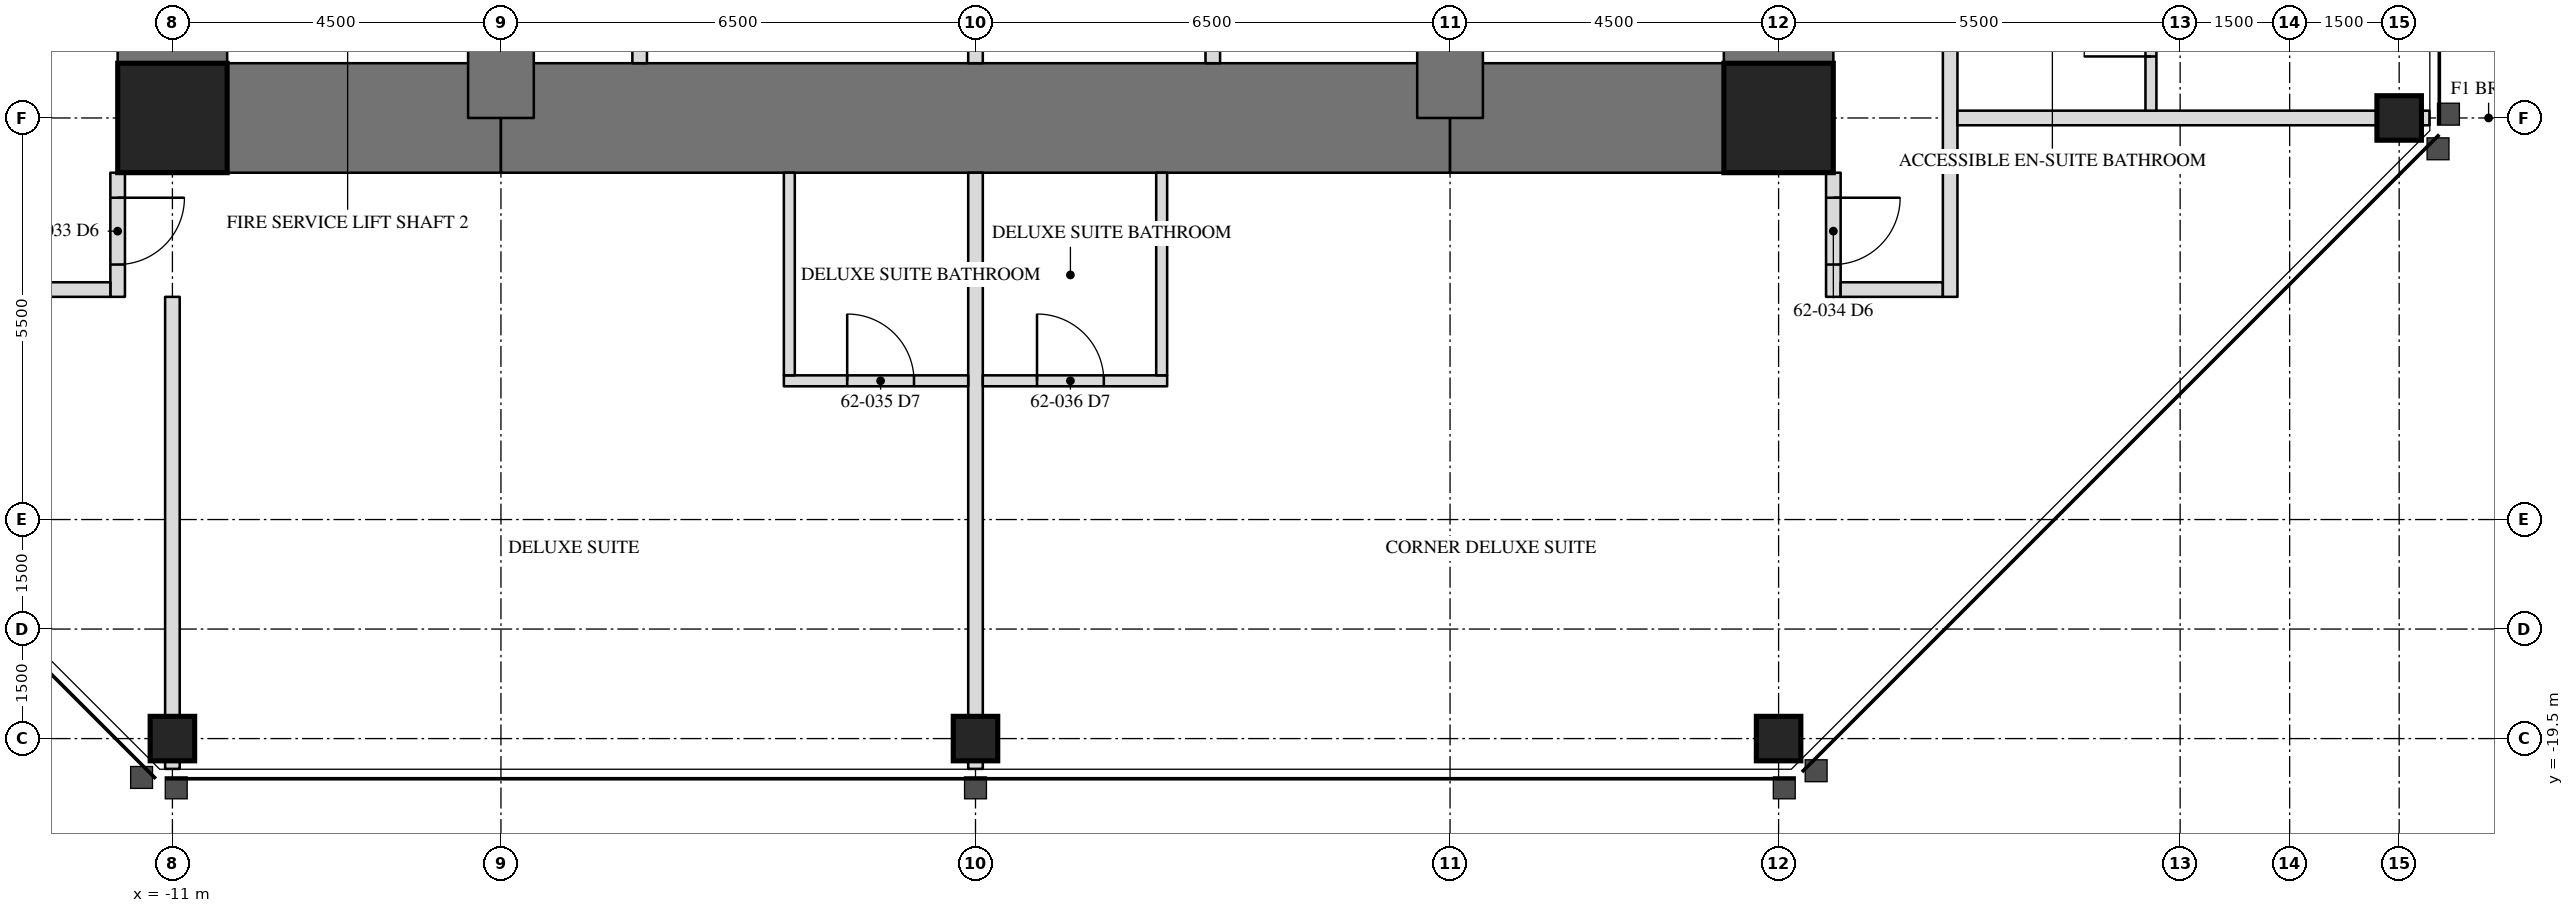
"""IFC4 building model, lengths in metres.
Left out: names, types, materials, properties, quantities, classifications, styles, units other than length and angle.
Written with IfcOpenShell. Run it as: python <this file> out.ifc"""

import sys

from ifc_helpers import new_model, si_unit, direction, frame, frame_2d, origin, origin_2d, place, context, subcontext, project, spatial, rectangle, hollow_rectangle, extrude, element, fill, save


model = new_model("IFC4")
c1 = context("Model", 3, precision=1e-05, world=origin(), true_north=direction((0.0, 1.0)))
c2 = subcontext(c1, "Body", "Model", "MODEL_VIEW")
j1 = project(units=[si_unit("LENGTHUNIT", "METRE"), si_unit("PLANEANGLEUNIT", "RADIAN")], contexts=[c1])
p1 = place(None, origin())
s1 = spatial("IfcSite", under=j1, at=p1, CompositionType="ELEMENT")
p2 = place(p1, origin())
s2 = spatial("IfcBuilding", under=s1, at=p2, CompositionType="ELEMENT")
p3 = place(p2, frame((0.0, 0.0, 253.7)))
s3 = spatial("IfcBuildingStorey", under=s2, at=p3, CompositionType="ELEMENT", Elevation=253.7)
for number, where, z_axis, x_axis in (
    (1, (-11.0, -19.5, 0.0), (0.0, 0.0, 1.0), (1.0, 0.0, 0.0)),
    (2, (0.0, -19.5, 0.0), (0.0, 0.0, 1.0), (1.0, 0.0, 0.0)),
    (3, (11.0, -19.5, 0.0), (0.0, 0.0, 1.0), (1.0, 0.0, 0.0)),
    (4, (19.5, -11.0, 0.0), (0.0, 0.0, 1.0), (0.0, 1.0, 0.0)),
):
    element("IfcColumn", number, at=place(p3, frame(where, z_axis=z_axis, x_axis=x_axis)), inside=s3, PredefinedType="COLUMN", context=c2, shape_type="SweptSolid", body=[
        extrude(hollow_rectangle(XDim=0.61, YDim=0.61, WallThickness=0.051, at=origin_2d()), origin(), (0.0, 0.0, 1.0), 3.5),
    ])
p4 = place(p3, frame((11.0, -11.0, 0.0), z_axis=(0.0, 0.0, 1.0), x_axis=(0.0, 1.0, 0.0)))
e5 = element("IfcWall", 5, at=p4, inside=s3, PredefinedType="SHEAR", context=c2, shape_type="SweptSolid", body=[
    extrude(rectangle(XDim=22.0, YDim=1.5, at=frame_2d((11.0, 0.0))), origin(), (0.0, 0.0, 1.0), 3.5),
])
p5 = place(p4, frame((15.393, 0.0, 0.0)))
e6 = element("IfcOpeningElement", 6, at=p5, cuts=e5, PredefinedType="OPENING", context=c2, shape_type="SweptSolid", body=[
    extrude(rectangle(XDim=0.915, YDim=2.134, at=frame_2d((0.458, 1.067))), frame((0.0, 0.76, 0.0), z_axis=(0.0, -1.0, 0.0), x_axis=(1.0, 0.0, 0.0)), (0.0, 0.0, 1.0), 1.52),
])
p6 = place(p3, frame((-11.0, 11.0, 0.0), z_axis=(0.0, 0.0, 1.0), x_axis=(0.0, -1.0, 0.0)))
e7 = element("IfcWall", 7, at=p6, inside=s3, PredefinedType="SHEAR", context=c2, shape_type="SweptSolid", body=[
    extrude(rectangle(XDim=22.0, YDim=1.5, at=frame_2d((11.0, 0.0))), origin(), (0.0, 0.0, 1.0), 3.5),
])
p7 = place(p6, frame((15.393, 0.0, 0.0)))
e8 = element("IfcOpeningElement", 8, at=p7, cuts=e7, PredefinedType="OPENING", context=c2, shape_type="SweptSolid", body=[
    extrude(rectangle(XDim=0.915, YDim=2.134, at=frame_2d((0.458, 1.067))), frame((0.0, 0.76, 0.0), z_axis=(0.0, -1.0, 0.0), x_axis=(1.0, 0.0, 0.0)), (0.0, 0.0, 1.0), 1.52),
])
p8 = place(p3, frame((-11.0, -11.0, 0.0), z_axis=(0.0, 0.0, 1.0), x_axis=(1.0, 0.0, 0.0)))
e9 = element("IfcWall", 9, at=p8, inside=s3, PredefinedType="SHEAR", context=c2, shape_type="SweptSolid", body=[
    extrude(rectangle(XDim=4.5, YDim=1.5, at=frame_2d((2.25, 0.0))), origin(), (0.0, 0.0, 1.0), 3.5),
])
p9 = place(p3, frame((-6.5, -11.0, 0.0), z_axis=(0.0, 0.0, 1.0), x_axis=(1.0, 0.0, 0.0)))
e10 = element("IfcWall", 10, at=p9, inside=s3, PredefinedType="SHEAR", context=c2, shape_type="SweptSolid", body=[
    extrude(rectangle(XDim=13.0, YDim=1.5, at=frame_2d((6.5, 0.0))), origin(), (0.0, 0.0, 1.0), 3.5),
])
p10 = place(p3, frame((6.5, -11.0, 0.0), z_axis=(0.0, 0.0, 1.0), x_axis=(1.0, 0.0, 0.0)))
e11 = element("IfcWall", 11, at=p10, inside=s3, PredefinedType="SHEAR", context=c2, shape_type="SweptSolid", body=[
    extrude(rectangle(XDim=4.5, YDim=1.5, at=frame_2d((2.25, 0.0))), origin(), (0.0, 0.0, 1.0), 3.5),
])
for number, where, z_axis, x_axis in (
    (12, (6.5, -11.0, 0.0), (0.0, 0.0, 1.0), (0.0, 1.0, 0.0)),
    (13, (-6.5, -6.5, 0.0), (0.0, 0.0, 1.0), (0.0, -1.0, 0.0)),
):
    element("IfcWall", number, at=place(p3, frame(where, z_axis=z_axis, x_axis=x_axis)), inside=s3, PredefinedType="SHEAR", context=c2, shape_type="SweptSolid", body=[
        extrude(rectangle(XDim=4.5, YDim=0.9, at=frame_2d((2.25, 0.0))), origin(), (0.0, 0.0, 1.0), 3.5),
    ])
for number, where, z_axis, x_axis in (
    (14, (-11.0, -11.0, 0.0), (0.0, 0.0, 1.0), (1.0, 0.0, 0.0)),
    (15, (11.0, -11.0, 0.0), (0.0, 0.0, 1.0), (1.0, 0.0, 0.0)),
):
    element("IfcColumn", number, at=place(p3, frame(where, z_axis=z_axis, x_axis=x_axis)), inside=s3, PredefinedType="COLUMN", context=c2, shape_type="SweptSolid", body=[
        extrude(hollow_rectangle(XDim=1.499, YDim=1.499, WallThickness=0.102, at=origin_2d()), origin(), (0.0, 0.0, 1.0), 3.5),
    ])
for number, where, z_axis, x_axis in (
    (16, (0.0, -10.25, 0.0), (0.0, 0.0, 1.0), (0.0, 1.0, 0.0)),
    (17, (3.25, -10.25, 0.0), (0.0, 0.0, 1.0), (0.0, 1.0, 0.0)),
    (18, (-4.6, -10.25, 0.0), (0.0, 0.0, 1.0), (0.0, 1.0, 0.0)),
):
    element("IfcWall", number, at=place(p3, frame(where, z_axis=z_axis, x_axis=x_axis)), inside=s3, PredefinedType="PARTITIONING", context=c2, shape_type="SweptSolid", body=[
        extrude(rectangle(XDim=3.3, YDim=0.2, at=frame_2d((1.65, 0.0))), origin(), (0.0, 0.0, 1.0), 3.31),
    ])
p11 = place(p3, frame((-11.75, -11.75, 0.0), z_axis=(0.0, 0.0, 1.0), x_axis=(0.0, -1.0, 0.0)))
e19 = element("IfcWall", 19, at=p11, inside=s3, PredefinedType="PARTITIONING", context=c2, shape_type="SweptSolid", body=[
    extrude(rectangle(XDim=1.7, YDim=0.2, at=frame_2d((0.85, 0.0))), origin(), (0.0, 0.0, 1.0), 3.31),
])
p12 = place(p11, frame((0.343, 0.0, 0.0)))
e20 = element("IfcOpeningElement", 20, at=p12, cuts=e19, PredefinedType="OPENING", context=c2, shape_type="SweptSolid", body=[
    extrude(rectangle(XDim=0.915, YDim=2.134, at=frame_2d((0.458, 1.067))), frame((0.0, 0.11, 0.0), z_axis=(0.0, -1.0, 0.0), x_axis=(1.0, 0.0, 0.0)), (0.0, 0.0, 1.0), 0.22),
])
p13 = place(p3, frame((11.75, -11.75, 0.0), z_axis=(0.0, 0.0, 1.0), x_axis=(0.0, -1.0, 0.0)))
e21 = element("IfcWall", 21, at=p13, inside=s3, PredefinedType="PARTITIONING", context=c2, shape_type="SweptSolid", body=[
    extrude(rectangle(XDim=1.7, YDim=0.2, at=frame_2d((0.85, 0.0))), origin(), (0.0, 0.0, 1.0), 3.31),
])
p14 = place(p13, frame((0.343, 0.0, 0.0)))
e22 = element("IfcOpeningElement", 22, at=p14, cuts=e21, PredefinedType="OPENING", context=c2, shape_type="SweptSolid", body=[
    extrude(rectangle(XDim=0.915, YDim=2.134, at=frame_2d((0.458, 1.067))), frame((0.0, 0.11, 0.0), z_axis=(0.0, -1.0, 0.0), x_axis=(1.0, 0.0, 0.0)), (0.0, 0.0, 1.0), 0.22),
])
p15 = place(p3, frame((-14.25, -13.35, 0.0), z_axis=(0.0, 0.0, 1.0), x_axis=(1.0, 0.0, 0.0)))
e23 = element("IfcWall", 23, at=p15, inside=s3, PredefinedType="PARTITIONING", context=c2, shape_type="SweptSolid", body=[
    extrude(rectangle(XDim=2.4, YDim=0.2, at=frame_2d((1.2, 0.0))), origin(), (0.0, 0.0, 1.0), 3.31),
])
p16 = place(p3, frame((11.85, -13.35, 0.0), z_axis=(0.0, 0.0, 1.0), x_axis=(1.0, 0.0, 0.0)))
e24 = element("IfcWall", 24, at=p16, inside=s3, PredefinedType="PARTITIONING", context=c2, shape_type="SweptSolid", body=[
    extrude(rectangle(XDim=1.4, YDim=0.2, at=frame_2d((0.7, 0.0))), origin(), (0.0, 0.0, 1.0), 3.31),
])
p17 = place(p3, frame((13.35, -13.45, 0.0), z_axis=(0.0, 0.0, 1.0), x_axis=(0.0, 1.0, 0.0)))
e25 = element("IfcWall", 25, at=p17, inside=s3, PredefinedType="PARTITIONING", context=c2, shape_type="SweptSolid", body=[
    extrude(rectangle(XDim=26.7, YDim=0.2, at=frame_2d((13.35, 0.0))), origin(), (0.0, 0.0, 1.0), 3.31),
])
p18 = place(p17, frame((5.353, 0.0, 0.0)))
e26 = element("IfcOpeningElement", 26, at=p18, cuts=e25, PredefinedType="OPENING", context=c2, shape_type="SweptSolid", body=[
    extrude(rectangle(XDim=0.915, YDim=2.134, at=frame_2d((0.458, 1.067))), frame((0.0, 0.11, 0.0), z_axis=(0.0, -1.0, 0.0), x_axis=(1.0, 0.0, 0.0)), (0.0, 0.0, 1.0), 0.22),
])
p19 = place(p17, frame((12.439, 0.0, 0.0)))
e27 = element("IfcOpeningElement", 27, at=p19, cuts=e25, PredefinedType="OPENING", context=c2, shape_type="SweptSolid", body=[
    extrude(rectangle(XDim=0.915, YDim=2.134, at=frame_2d((0.458, 1.067))), frame((0.0, 0.11, 0.0), z_axis=(0.0, -1.0, 0.0), x_axis=(1.0, 0.0, 0.0)), (0.0, 0.0, 1.0), 0.22),
])
p20 = place(p17, frame((19.159, 0.0, 0.0)))
e28 = element("IfcOpeningElement", 28, at=p20, cuts=e25, PredefinedType="OPENING", context=c2, shape_type="SweptSolid", body=[
    extrude(rectangle(XDim=0.915, YDim=2.134, at=frame_2d((0.458, 1.067))), frame((0.0, 0.11, 0.0), z_axis=(0.0, -1.0, 0.0), x_axis=(1.0, 0.0, 0.0)), (0.0, 0.0, 1.0), 0.22),
])
p21 = place(p3, frame((13.45, -11.0, 0.0), z_axis=(0.0, 0.0, 1.0), x_axis=(1.0, 0.0, 0.0)))
e29 = element("IfcWall", 29, at=p21, inside=s3, PredefinedType="PARTITIONING", context=c2, shape_type="SweptSolid", body=[
    extrude(rectangle(XDim=6.465, YDim=0.2, at=frame_2d((3.232, 0.0))), origin(), (0.0, 0.0, 1.0), 2.383),
])
p22 = place(p3, frame((16.1, -10.9, 0.0), z_axis=(0.0, 0.0, 1.0), x_axis=(0.0, 1.0, 0.0)))
e30 = element("IfcWall", 30, at=p22, inside=s3, PredefinedType="PARTITIONING", context=c2, shape_type="SweptSolid", body=[
    extrude(rectangle(XDim=2.525, YDim=0.15, at=frame_2d((1.262, 0.0))), origin(), (0.0, 0.0, 1.0), 3.31),
])
p23 = place(p22, frame((0.742, 0.0, 0.0)))
e31 = element("IfcOpeningElement", 31, at=p23, cuts=e30, PredefinedType="OPENING", context=c2, shape_type="SweptSolid", body=[
    extrude(rectangle(XDim=0.915, YDim=2.032, at=frame_2d((0.458, 1.016))), frame((0.0, 0.085, 0.0), z_axis=(0.0, -1.0, 0.0), x_axis=(1.0, 0.0, 0.0)), (0.0, 0.0, 1.0), 0.17),
])
p24 = place(p3, frame((-11.0, -13.45, 0.0), z_axis=(0.0, 0.0, 1.0), x_axis=(0.0, -1.0, 0.0)))
e32 = element("IfcWall", 32, at=p24, inside=s3, PredefinedType="PARTITIONING", context=c2, shape_type="SweptSolid", body=[
    extrude(rectangle(XDim=6.465, YDim=0.2, at=frame_2d((3.232, 0.0))), origin(), (0.0, 0.0, 1.0), 2.383),
])
p25 = place(p3, frame((0.0, -11.75, 0.0), z_axis=(0.0, 0.0, 1.0), x_axis=(0.0, -1.0, 0.0)))
e33 = element("IfcWall", 33, at=p25, inside=s3, PredefinedType="PARTITIONING", context=c2, shape_type="SweptSolid", body=[
    extrude(rectangle(XDim=8.165, YDim=0.2, at=frame_2d((4.083, 0.0))), origin(), (0.0, 0.0, 1.0), 2.383),
])
p26 = place(p3, frame((-2.625, -14.6, 0.0), z_axis=(0.0, 0.0, 1.0), x_axis=(1.0, 0.0, 0.0)))
e34 = element("IfcWall", 34, at=p26, inside=s3, PredefinedType="PARTITIONING", context=c2, shape_type="SweptSolid", body=[
    extrude(rectangle(XDim=2.525, YDim=0.15, at=frame_2d((1.262, 0.0))), origin(), (0.0, 0.0, 1.0), 3.31),
])
p27 = place(p26, frame((0.867, 0.0, 0.0)))
e35 = element("IfcOpeningElement", 35, at=p27, cuts=e34, PredefinedType="OPENING", context=c2, shape_type="SweptSolid", body=[
    extrude(rectangle(XDim=0.915, YDim=2.032, at=frame_2d((0.458, 1.016))), frame((0.0, 0.085, 0.0), z_axis=(0.0, -1.0, 0.0), x_axis=(1.0, 0.0, 0.0)), (0.0, 0.0, 1.0), 0.17),
])
p28 = place(p3, frame((-2.55, -11.75, 0.0), z_axis=(0.0, 0.0, 1.0), x_axis=(0.0, -1.0, 0.0)))
e36 = element("IfcWall", 36, at=p28, inside=s3, PredefinedType="PARTITIONING", context=c2, shape_type="SweptSolid", body=[
    extrude(rectangle(XDim=2.775, YDim=0.15, at=frame_2d((1.387, 0.0))), origin(), (0.0, 0.0, 1.0), 3.31),
])
p29 = place(p3, frame((0.1, -14.6, 0.0), z_axis=(0.0, 0.0, 1.0), x_axis=(1.0, 0.0, 0.0)))
e37 = element("IfcWall", 37, at=p29, inside=s3, PredefinedType="PARTITIONING", context=c2, shape_type="SweptSolid", body=[
    extrude(rectangle(XDim=2.525, YDim=0.15, at=frame_2d((1.262, 0.0))), origin(), (0.0, 0.0, 1.0), 3.31),
])
p30 = place(p29, frame((0.742, 0.0, 0.0)))
e38 = element("IfcOpeningElement", 38, at=p30, cuts=e37, PredefinedType="OPENING", context=c2, shape_type="SweptSolid", body=[
    extrude(rectangle(XDim=0.915, YDim=2.032, at=frame_2d((0.458, 1.016))), frame((0.0, 0.085, 0.0), z_axis=(0.0, -1.0, 0.0), x_axis=(1.0, 0.0, 0.0)), (0.0, 0.0, 1.0), 0.17),
])
p31 = place(p3, frame((2.55, -11.75, 0.0), z_axis=(0.0, 0.0, 1.0), x_axis=(0.0, -1.0, 0.0)))
e39 = element("IfcWall", 39, at=p31, inside=s3, PredefinedType="PARTITIONING", context=c2, shape_type="SweptSolid", body=[
    extrude(rectangle(XDim=2.775, YDim=0.15, at=frame_2d((1.387, 0.0))), origin(), (0.0, 0.0, 1.0), 3.31),
])
p32 = place(p23, origin())
e40 = element("IfcDoor", 40, at=p32, inside=s3, OperationType="SINGLE_SWING_LEFT", PredefinedType="DOOR", context=c2, shape_type="SweptSolid", body=[
    extrude(rectangle(XDim=0.915, YDim=2.032, at=frame_2d((0.458, 1.016))), frame((0.0, 0.025, 0.0), z_axis=(0.0, -1.0, 0.0), x_axis=(1.0, 0.0, 0.0)), (0.0, 0.0, 1.0), 0.05),
])
fill(e31, e40)
p33 = place(p12, origin())
e41 = element("IfcDoor", 41, at=p33, inside=s3, OperationType="SINGLE_SWING_LEFT", PredefinedType="DOOR", context=c2, shape_type="SweptSolid", body=[
    extrude(rectangle(XDim=0.915, YDim=2.134, at=frame_2d((0.458, 1.067))), frame((0.0, 0.025, 0.0), z_axis=(0.0, -1.0, 0.0), x_axis=(1.0, 0.0, 0.0)), (0.0, 0.0, 1.0), 0.05),
])
fill(e20, e41)
p34 = place(p14, origin())
e42 = element("IfcDoor", 42, at=p34, inside=s3, OperationType="SINGLE_SWING_LEFT", PredefinedType="DOOR", context=c2, shape_type="SweptSolid", body=[
    extrude(rectangle(XDim=0.915, YDim=2.134, at=frame_2d((0.458, 1.067))), frame((0.0, 0.025, 0.0), z_axis=(0.0, -1.0, 0.0), x_axis=(1.0, 0.0, 0.0)), (0.0, 0.0, 1.0), 0.05),
])
fill(e22, e42)
p35 = place(p27, origin())
e43 = element("IfcDoor", 43, at=p35, inside=s3, OperationType="SINGLE_SWING_LEFT", PredefinedType="DOOR", context=c2, shape_type="SweptSolid", body=[
    extrude(rectangle(XDim=0.915, YDim=2.032, at=frame_2d((0.458, 1.016))), frame((0.0, 0.025, 0.0), z_axis=(0.0, -1.0, 0.0), x_axis=(1.0, 0.0, 0.0)), (0.0, 0.0, 1.0), 0.05),
])
fill(e35, e43)
p36 = place(p30, origin())
e44 = element("IfcDoor", 44, at=p36, inside=s3, OperationType="SINGLE_SWING_LEFT", PredefinedType="DOOR", context=c2, shape_type="SweptSolid", body=[
    extrude(rectangle(XDim=0.915, YDim=2.032, at=frame_2d((0.458, 1.016))), frame((0.0, 0.025, 0.0), z_axis=(0.0, -1.0, 0.0), x_axis=(1.0, 0.0, 0.0)), (0.0, 0.0, 1.0), 0.05),
])
fill(e38, e44)
save(model, sys.argv[1])
